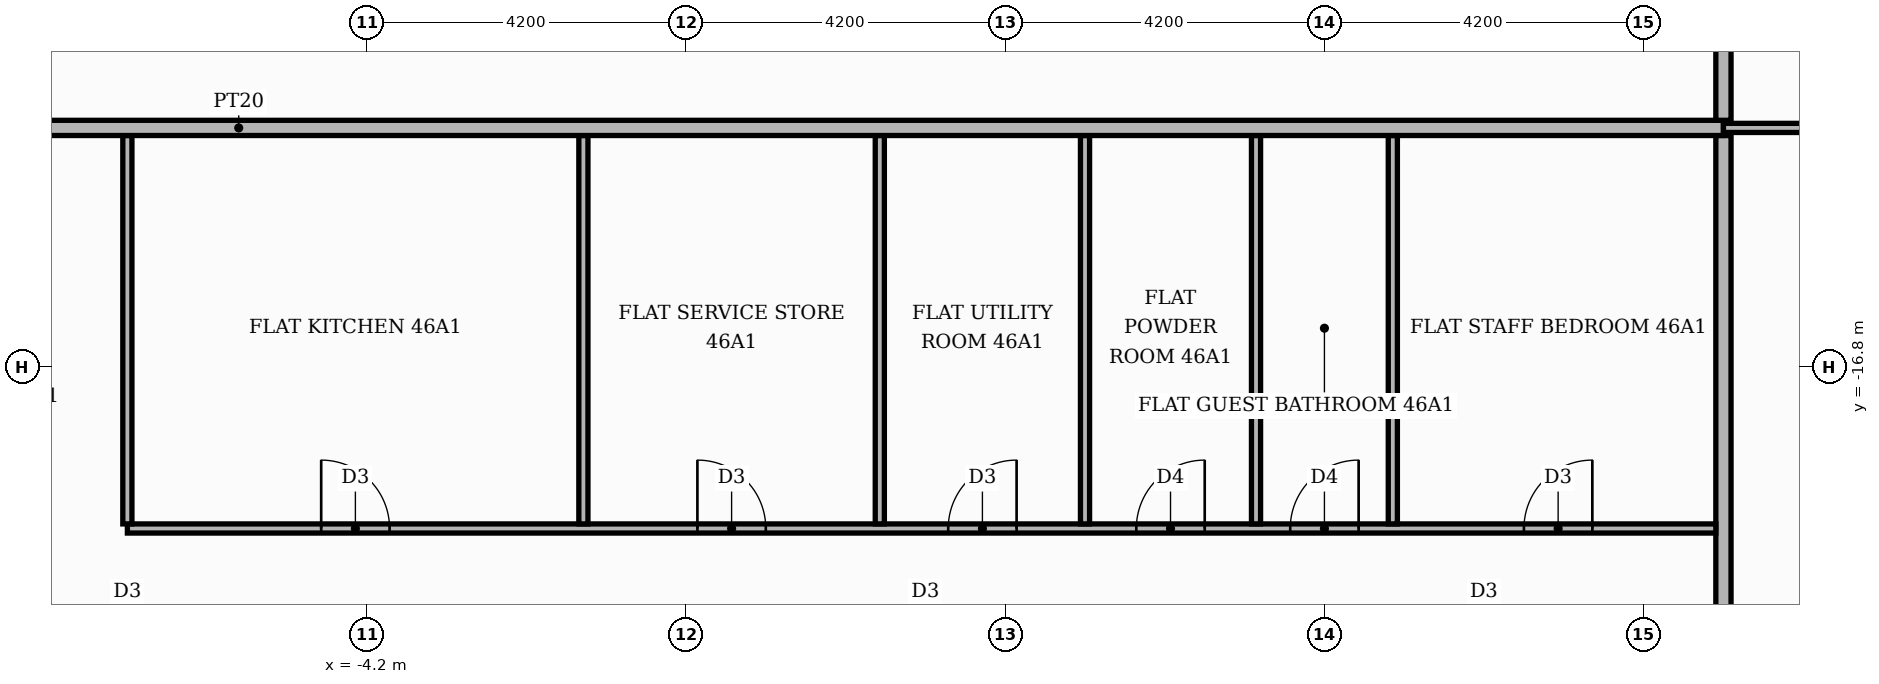
"""IFC4 building model, lengths in metres.
Left out: names, types, materials, properties, quantities, classifications, styles, units other than length and angle.
Written with IfcOpenShell. Run it as: python <this file> out.ifc"""

import sys

from ifc_helpers import new_model, si_unit, direction, frame, frame_2d, origin, place, context, subcontext, project, spatial, rectangle, extrude, element, fill, save


model = new_model("IFC4")
c1 = context("Model", 3, precision=1e-05, world=origin(), true_north=direction((0.0, 1.0)))
c2 = subcontext(c1, "Body", "Model", "MODEL_VIEW")
j1 = project(units=[si_unit("LENGTHUNIT", "METRE"), si_unit("PLANEANGLEUNIT", "RADIAN")], contexts=[c1])
p1 = place(None, origin())
s1 = spatial("IfcSite", under=j1, at=p1, CompositionType="ELEMENT")
p2 = place(p1, origin())
s2 = spatial("IfcBuilding", under=s1, at=p2, CompositionType="ELEMENT")
p3 = place(p2, frame((0.0, 0.0, 196.2)))
s3 = spatial("IfcBuildingStorey", under=s2, at=p3, CompositionType="ELEMENT", Elevation=196.2)
p4 = place(p3, frame((13.65, -25.42, 0.0), z_axis=(0.0, 0.0, 1.0), x_axis=(0.0, 1.0, 0.0)))
e1 = element("IfcWall", 1, at=p4, inside=s3, PredefinedType="PARTITIONING", context=c2, shape_type="SweptSolid", body=[
    extrude(rectangle(XDim=11.67, YDim=0.2, at=frame_2d((5.835, 0.0))), origin(), (0.0, 0.0, 1.0), 3.48),
])
p5 = place(p3, frame((-7.35, -18.92, 0.0), z_axis=(0.0, 0.0, 1.0), x_axis=(1.0, 0.0, 0.0)))
e2 = element("IfcWall", 2, at=p5, inside=s3, PredefinedType="PARTITIONING", context=c2, shape_type="SweptSolid", body=[
    extrude(rectangle(XDim=20.9, YDim=0.12, at=frame_2d((10.45, 0.0))), origin(), (0.0, 0.0, 1.0), 3.48),
])
p6 = place(p5, frame((2.55, 0.0, 0.0)))
e3 = element("IfcOpeningElement", 3, at=p6, cuts=e2, PredefinedType="OPENING", context=c2, shape_type="SweptSolid", body=[
    extrude(rectangle(XDim=0.9, YDim=2.1, at=frame_2d((0.45, 1.05))), frame((0.0, 0.07, 0.0), z_axis=(0.0, -1.0, 0.0), x_axis=(1.0, 0.0, 0.0)), (0.0, 0.0, 1.0), 0.14),
])
p7 = place(p5, frame((7.5, 0.0, 0.0)))
e4 = element("IfcOpeningElement", 4, at=p7, cuts=e2, PredefinedType="OPENING", context=c2, shape_type="SweptSolid", body=[
    extrude(rectangle(XDim=0.9, YDim=2.1, at=frame_2d((0.45, 1.05))), frame((0.0, 0.07, 0.0), z_axis=(0.0, -1.0, 0.0), x_axis=(1.0, 0.0, 0.0)), (0.0, 0.0, 1.0), 0.14),
])
p8 = place(p5, frame((10.8, 0.0, 0.0)))
e5 = element("IfcOpeningElement", 5, at=p8, cuts=e2, PredefinedType="OPENING", context=c2, shape_type="SweptSolid", body=[
    extrude(rectangle(XDim=0.9, YDim=2.1, at=frame_2d((0.45, 1.05))), frame((0.0, 0.07, 0.0), z_axis=(0.0, -1.0, 0.0), x_axis=(1.0, 0.0, 0.0)), (0.0, 0.0, 1.0), 0.14),
])
p9 = place(p5, frame((13.275, 0.0, 0.0)))
e6 = element("IfcOpeningElement", 6, at=p9, cuts=e2, PredefinedType="OPENING", context=c2, shape_type="SweptSolid", body=[
    extrude(rectangle(XDim=0.9, YDim=2.1, at=frame_2d((0.45, 1.05))), frame((0.0, 0.07, 0.0), z_axis=(0.0, -1.0, 0.0), x_axis=(1.0, 0.0, 0.0)), (0.0, 0.0, 1.0), 0.14),
])
p10 = place(p5, frame((15.3, 0.0, 0.0)))
e7 = element("IfcOpeningElement", 7, at=p10, cuts=e2, PredefinedType="OPENING", context=c2, shape_type="SweptSolid", body=[
    extrude(rectangle(XDim=0.9, YDim=2.1, at=frame_2d((0.45, 1.05))), frame((0.0, 0.07, 0.0), z_axis=(0.0, -1.0, 0.0), x_axis=(1.0, 0.0, 0.0)), (0.0, 0.0, 1.0), 0.14),
])
p11 = place(p5, frame((18.375, 0.0, 0.0)))
e8 = element("IfcOpeningElement", 8, at=p11, cuts=e2, PredefinedType="OPENING", context=c2, shape_type="SweptSolid", body=[
    extrude(rectangle(XDim=0.9, YDim=2.1, at=frame_2d((0.45, 1.05))), frame((0.0, 0.07, 0.0), z_axis=(0.0, -1.0, 0.0), x_axis=(1.0, 0.0, 0.0)), (0.0, 0.0, 1.0), 0.14),
])
for number, where, z_axis, x_axis in (
    (9, (-7.35, -18.86, 0.0), (0.0, 0.0, 1.0), (0.0, 1.0, 0.0)),
    (10, (-1.35, -18.86, 0.0), (0.0, 0.0, 1.0), (0.0, 1.0, 0.0)),
    (11, (2.55, -18.86, 0.0), (0.0, 0.0, 1.0), (0.0, 1.0, 0.0)),
    (12, (5.25, -18.86, 0.0), (0.0, 0.0, 1.0), (0.0, 1.0, 0.0)),
    (13, (7.5, -18.86, 0.0), (0.0, 0.0, 1.0), (0.0, 1.0, 0.0)),
    (14, (9.3, -18.86, 0.0), (0.0, 0.0, 1.0), (0.0, 1.0, 0.0)),
):
    element("IfcWall", number, at=place(p3, frame(where, z_axis=z_axis, x_axis=x_axis)), inside=s3, PredefinedType="PARTITIONING", context=c2, shape_type="SweptSolid", body=[
        extrude(rectangle(XDim=5.11, YDim=0.12, at=frame_2d((2.555, 0.0))), origin(), (0.0, 0.0, 1.0), 3.48),
    ])
p12 = place(p3, frame((-25.42, -13.65, 0.0), z_axis=(0.0, 0.0, 1.0), x_axis=(1.0, 0.0, 0.0)))
e15 = element("IfcWall", 15, at=p12, inside=s3, PredefinedType="PARTITIONING", context=c2, shape_type="SweptSolid", body=[
    extrude(rectangle(XDim=39.07, YDim=0.2, at=frame_2d((19.535, 0.0))), origin(), (0.0, 0.0, 1.0), 3.48),
])
p13 = place(p12, frame((14.37, 0.0, 0.0)))
e16 = element("IfcOpeningElement", 16, at=p13, cuts=e15, PredefinedType="OPENING", context=c2, shape_type="SweptSolid", body=[
    extrude(rectangle(XDim=1.1, YDim=2.4, at=frame_2d((0.55, 1.2))), frame((0.0, 0.11, 0.0), z_axis=(0.0, -1.0, 0.0), x_axis=(1.0, 0.0, 0.0)), (0.0, 0.0, 1.0), 0.22),
])
p14 = place(p3, frame((13.65, -13.65, 0.0), z_axis=(0.0, 0.0, 1.0), x_axis=(1.0, 0.0, 0.0)))
e17 = element("IfcWall", 17, at=p14, inside=s3, PredefinedType="PARTITIONING", context=c2, shape_type="SweptSolid", body=[
    extrude(rectangle(XDim=7.07, YDim=0.12, at=frame_2d((3.535, 0.0))), origin(), (0.0, 0.0, 1.0), 3.48),
])
p15 = place(p14, frame((3.085, 0.0, 0.0)))
e18 = element("IfcOpeningElement", 18, at=p15, cuts=e17, PredefinedType="OPENING", context=c2, shape_type="SweptSolid", body=[
    extrude(rectangle(XDim=0.9, YDim=2.1, at=frame_2d((0.45, 1.05))), frame((0.0, 0.07, 0.0), z_axis=(0.0, -1.0, 0.0), x_axis=(1.0, 0.0, 0.0)), (0.0, 0.0, 1.0), 0.14),
])
p16 = place(p3, frame((13.65, -13.55, 0.0), z_axis=(0.0, 0.0, 1.0), x_axis=(0.0, 1.0, 0.0)))
e19 = element("IfcWall", 19, at=p16, inside=s3, PredefinedType="PARTITIONING", context=c2, shape_type="SweptSolid", body=[
    extrude(rectangle(XDim=2.45, YDim=0.2, at=frame_2d((1.225, 0.0))), origin(), (0.0, 0.0, 1.0), 3.48),
])
p17 = place(p6, origin())
e20 = element("IfcDoor", 20, at=p17, inside=s3, OperationType="SINGLE_SWING_LEFT", PredefinedType="DOOR", context=c2, shape_type="SweptSolid", body=[
    extrude(rectangle(XDim=0.9, YDim=2.1, at=frame_2d((0.45, 1.05))), frame((0.0, 0.025, 0.0), z_axis=(0.0, -1.0, 0.0), x_axis=(1.0, 0.0, 0.0)), (0.0, 0.0, 1.0), 0.05),
])
fill(e3, e20)
p18 = place(p7, origin())
e21 = element("IfcDoor", 21, at=p18, inside=s3, OperationType="SINGLE_SWING_LEFT", PredefinedType="DOOR", context=c2, shape_type="SweptSolid", body=[
    extrude(rectangle(XDim=0.9, YDim=2.1, at=frame_2d((0.45, 1.05))), frame((0.0, 0.025, 0.0), z_axis=(0.0, -1.0, 0.0), x_axis=(1.0, 0.0, 0.0)), (0.0, 0.0, 1.0), 0.05),
])
fill(e4, e21)
p19 = place(p8, origin())
e22 = element("IfcDoor", 22, at=p19, inside=s3, OperationType="SINGLE_SWING_RIGHT", PredefinedType="DOOR", context=c2, shape_type="SweptSolid", body=[
    extrude(rectangle(XDim=0.9, YDim=2.1, at=frame_2d((0.45, 1.05))), frame((0.0, 0.025, 0.0), z_axis=(0.0, -1.0, 0.0), x_axis=(1.0, 0.0, 0.0)), (0.0, 0.0, 1.0), 0.05),
])
fill(e5, e22)
p20 = place(p9, origin())
e23 = element("IfcDoor", 23, at=p20, inside=s3, OperationType="SINGLE_SWING_RIGHT", PredefinedType="DOOR", context=c2, shape_type="SweptSolid", body=[
    extrude(rectangle(XDim=0.9, YDim=2.1, at=frame_2d((0.45, 1.05))), frame((0.0, 0.025, 0.0), z_axis=(0.0, -1.0, 0.0), x_axis=(1.0, 0.0, 0.0)), (0.0, 0.0, 1.0), 0.05),
])
fill(e6, e23)
p21 = place(p10, origin())
e24 = element("IfcDoor", 24, at=p21, inside=s3, OperationType="SINGLE_SWING_RIGHT", PredefinedType="DOOR", context=c2, shape_type="SweptSolid", body=[
    extrude(rectangle(XDim=0.9, YDim=2.1, at=frame_2d((0.45, 1.05))), frame((0.0, 0.025, 0.0), z_axis=(0.0, -1.0, 0.0), x_axis=(1.0, 0.0, 0.0)), (0.0, 0.0, 1.0), 0.05),
])
fill(e7, e24)
p22 = place(p11, origin())
e25 = element("IfcDoor", 25, at=p22, inside=s3, OperationType="SINGLE_SWING_RIGHT", PredefinedType="DOOR", context=c2, shape_type="SweptSolid", body=[
    extrude(rectangle(XDim=0.9, YDim=2.1, at=frame_2d((0.45, 1.05))), frame((0.0, 0.025, 0.0), z_axis=(0.0, -1.0, 0.0), x_axis=(1.0, 0.0, 0.0)), (0.0, 0.0, 1.0), 0.05),
])
fill(e8, e25)
save(model, sys.argv[1])
